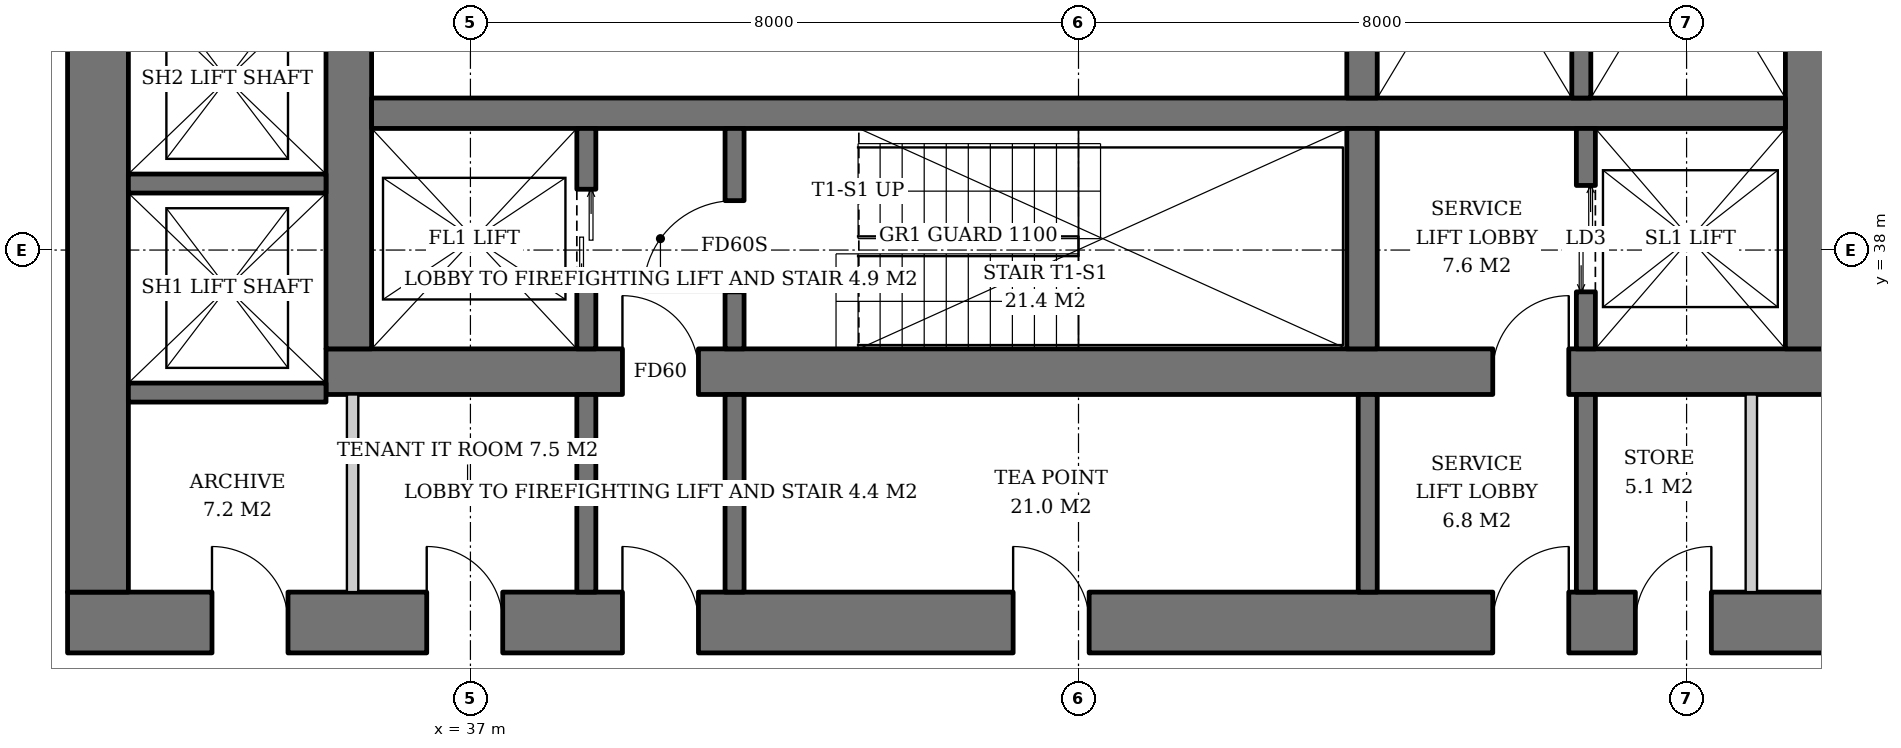
"""IFC4 building model, lengths in metres.
Left out: names, types, materials, properties, quantities, classifications, styles, units other than length and angle.
Written with IfcOpenShell. Run it as: python <this file> out.ifc"""

import sys

from ifc_helpers import new_model, si_unit, direction, frame, frame_2d, origin, place, context, subcontext, project, spatial, rectangle, extrude, element, fill, save


model = new_model("IFC4")
c1 = context("Model", 3, precision=1e-05, world=origin(), true_north=direction((0.0, 1.0)))
c2 = subcontext(c1, "Body", "Model", "MODEL_VIEW")
j1 = project(units=[si_unit("LENGTHUNIT", "METRE"), si_unit("PLANEANGLEUNIT", "RADIAN")], contexts=[c1])
p1 = place(None, origin())
s1 = spatial("IfcSite", under=j1, at=p1, CompositionType="ELEMENT")
p2 = place(p1, origin())
s2 = spatial("IfcBuilding", under=s1, at=p2, CompositionType="ELEMENT")
p3 = place(p2, frame((0.0, 0.0, 47.6)))
s3 = spatial("IfcBuildingStorey", under=s2, at=p3, CompositionType="ELEMENT", Elevation=47.6)
p4 = place(p3, frame((35.1, 36.4, 0.0), z_axis=(0.0, 0.0, 1.0), x_axis=(1.0, 0.0, 0.0)))
e1 = element("IfcWall", 1, at=p4, inside=s3, PredefinedType="SHEAR", context=c2, shape_type="SweptSolid", body=[
    extrude(rectangle(XDim=19.8, YDim=0.6, at=frame_2d((9.9, 0.0))), origin(), (0.0, 0.0, 1.0), 3.8),
])
p5 = place(p4, frame((3.9, 0.0, 0.0)))
e2 = element("IfcOpeningElement", 2, at=p5, cuts=e1, PredefinedType="OPENING", context=c2, shape_type="SweptSolid", body=[
    extrude(rectangle(XDim=1.0, YDim=2.1, at=frame_2d((0.5, 1.05))), frame((0.0, 0.31, 0.0), z_axis=(0.0, -1.0, 0.0), x_axis=(1.0, 0.0, 0.0)), (0.0, 0.0, 1.0), 0.62),
])
p6 = place(p4, frame((15.35, 0.0, 0.0)))
e3 = element("IfcOpeningElement", 3, at=p6, cuts=e1, PredefinedType="OPENING", context=c2, shape_type="SweptSolid", body=[
    extrude(rectangle(XDim=1.0, YDim=2.1, at=frame_2d((0.5, 1.05))), frame((0.0, 0.31, 0.0), z_axis=(0.0, -1.0, 0.0), x_axis=(1.0, 0.0, 0.0)), (0.0, 0.0, 1.0), 0.62),
])
p7 = place(p3, frame((35.4, 36.7, 0.0), z_axis=(0.0, 0.0, 1.0), x_axis=(0.0, 1.0, 0.0)))
e4 = element("IfcWall", 4, at=p7, inside=s3, PredefinedType="SHEAR", context=c2, shape_type="SweptSolid", body=[
    extrude(rectangle(XDim=18.6, YDim=0.6, at=frame_2d((9.3, 0.0))), origin(), (0.0, 0.0, 1.0), 3.8),
])
p8 = place(p7, frame((8.4, 0.0, 0.0)))
e5 = element("IfcOpeningElement", 5, at=p8, cuts=e4, PredefinedType="OPENING", context=c2, shape_type="SweptSolid", body=[
    extrude(rectangle(XDim=1.8, YDim=2.4, at=frame_2d((0.9, 1.2))), frame((0.0, 0.31, 0.0), z_axis=(0.0, -1.0, 0.0), x_axis=(1.0, 0.0, 0.0)), (0.0, 0.0, 1.0), 0.62),
])
p9 = place(p3, frame((54.6, 36.7, 0.0), z_axis=(0.0, 0.0, 1.0), x_axis=(0.0, 1.0, 0.0)))
e6 = element("IfcWall", 6, at=p9, inside=s3, PredefinedType="SHEAR", context=c2, shape_type="SweptSolid", body=[
    extrude(rectangle(XDim=18.6, YDim=0.6, at=frame_2d((9.3, 0.0))), origin(), (0.0, 0.0, 1.0), 3.8),
])
p10 = place(p9, frame((8.4, 0.0, 0.0)))
e7 = element("IfcOpeningElement", 7, at=p10, cuts=e6, PredefinedType="OPENING", context=c2, shape_type="SweptSolid", body=[
    extrude(rectangle(XDim=1.8, YDim=2.4, at=frame_2d((0.9, 1.2))), frame((0.0, 0.31, 0.0), z_axis=(0.0, -1.0, 0.0), x_axis=(1.0, 0.0, 0.0)), (0.0, 0.0, 1.0), 0.62),
])
p11 = place(p3, frame((31.7, 33.1, 0.0), z_axis=(0.0, 0.0, 1.0), x_axis=(1.0, 0.0, 0.0)))
e8 = element("IfcWall", 8, at=p11, inside=s3, PredefinedType="SHEAR", context=c2, shape_type="SweptSolid", body=[
    extrude(rectangle(XDim=26.6, YDim=0.8, at=frame_2d((13.3, 0.0))), origin(), (0.0, 0.0, 1.0), 3.8),
])
p12 = place(p11, frame((7.3, 0.0, 0.0)))
e9 = element("IfcOpeningElement", 9, at=p12, cuts=e8, PredefinedType="OPENING", context=c2, shape_type="SweptSolid", body=[
    extrude(rectangle(XDim=1.0, YDim=2.1, at=frame_2d((0.5, 1.05))), frame((0.0, 0.41, 0.0), z_axis=(0.0, -1.0, 0.0), x_axis=(1.0, 0.0, 0.0)), (0.0, 0.0, 1.0), 0.82),
])
p13 = place(p11, frame((18.75, 0.0, 0.0)))
e10 = element("IfcOpeningElement", 10, at=p13, cuts=e8, PredefinedType="OPENING", context=c2, shape_type="SweptSolid", body=[
    extrude(rectangle(XDim=1.0, YDim=2.1, at=frame_2d((0.5, 1.05))), frame((0.0, 0.41, 0.0), z_axis=(0.0, -1.0, 0.0), x_axis=(1.0, 0.0, 0.0)), (0.0, 0.0, 1.0), 0.82),
])
p14 = place(p11, frame((1.9, 0.0, 0.0)))
e11 = element("IfcOpeningElement", 11, at=p14, cuts=e8, PredefinedType="OPENING", context=c2, shape_type="SweptSolid", body=[
    extrude(rectangle(XDim=1.0, YDim=2.1, at=frame_2d((0.5, 1.05))), frame((0.0, 0.41, 0.0), z_axis=(0.0, -1.0, 0.0), x_axis=(1.0, 0.0, 0.0)), (0.0, 0.0, 1.0), 0.82),
])
p15 = place(p11, frame((4.725, 0.0, 0.0)))
e12 = element("IfcOpeningElement", 12, at=p15, cuts=e8, PredefinedType="OPENING", context=c2, shape_type="SweptSolid", body=[
    extrude(rectangle(XDim=1.0, YDim=2.1, at=frame_2d((0.5, 1.05))), frame((0.0, 0.41, 0.0), z_axis=(0.0, -1.0, 0.0), x_axis=(1.0, 0.0, 0.0)), (0.0, 0.0, 1.0), 0.82),
])
p16 = place(p11, frame((12.44, 0.0, 0.0)))
e13 = element("IfcOpeningElement", 13, at=p16, cuts=e8, PredefinedType="OPENING", context=c2, shape_type="SweptSolid", body=[
    extrude(rectangle(XDim=1.0, YDim=2.1, at=frame_2d((0.5, 1.05))), frame((0.0, 0.41, 0.0), z_axis=(0.0, -1.0, 0.0), x_axis=(1.0, 0.0, 0.0)), (0.0, 0.0, 1.0), 0.82),
])
p17 = place(p11, frame((20.626, 0.0, 0.0)))
e14 = element("IfcOpeningElement", 14, at=p17, cuts=e8, PredefinedType="OPENING", context=c2, shape_type="SweptSolid", body=[
    extrude(rectangle(XDim=1.0, YDim=2.1, at=frame_2d((0.5, 1.05))), frame((0.0, 0.41, 0.0), z_axis=(0.0, -1.0, 0.0), x_axis=(1.0, 0.0, 0.0)), (0.0, 0.0, 1.0), 0.82),
])
p18 = place(p11, frame((23.476, 0.0, 0.0)))
e15 = element("IfcOpeningElement", 15, at=p18, cuts=e8, PredefinedType="OPENING", context=c2, shape_type="SweptSolid", body=[
    extrude(rectangle(XDim=1.0, YDim=2.1, at=frame_2d((0.5, 1.05))), frame((0.0, 0.41, 0.0), z_axis=(0.0, -1.0, 0.0), x_axis=(1.0, 0.0, 0.0)), (0.0, 0.0, 1.0), 0.82),
])
p19 = place(p3, frame((32.1, 33.5, 0.0), z_axis=(0.0, 0.0, 1.0), x_axis=(0.0, 1.0, 0.0)))
e16 = element("IfcWall", 16, at=p19, inside=s3, PredefinedType="SHEAR", context=c2, shape_type="SweptSolid", body=[
    extrude(rectangle(XDim=25.0, YDim=0.8, at=frame_2d((12.5, 0.0))), origin(), (0.0, 0.0, 1.0), 3.8),
])
p20 = place(p19, frame((11.6, 0.0, 0.0)))
e17 = element("IfcOpeningElement", 17, at=p20, cuts=e16, PredefinedType="OPENING", context=c2, shape_type="SweptSolid", body=[
    extrude(rectangle(XDim=1.8, YDim=2.4, at=frame_2d((0.9, 1.2))), frame((0.0, 0.41, 0.0), z_axis=(0.0, -1.0, 0.0), x_axis=(1.0, 0.0, 0.0)), (0.0, 0.0, 1.0), 0.82),
])
p21 = place(p3, frame((35.7, 39.8, 0.0), z_axis=(0.0, 0.0, 1.0), x_axis=(1.0, 0.0, 0.0)))
e18 = element("IfcWall", 18, at=p21, inside=s3, PredefinedType="SHEAR", context=c2, shape_type="SweptSolid", body=[
    extrude(rectangle(XDim=18.6, YDim=0.4, at=frame_2d((9.3, 0.0))), origin(), (0.0, 0.0, 1.0), 3.8),
])
p22 = place(p3, frame((48.73, 36.7, 0.0), z_axis=(0.0, 0.0, 1.0), x_axis=(0.0, 1.0, 0.0)))
e19 = element("IfcWall", 19, at=p22, inside=s3, PredefinedType="SHEAR", context=c2, shape_type="SweptSolid", body=[
    extrude(rectangle(XDim=2.9, YDim=0.4, at=frame_2d((1.45, 0.0))), origin(), (0.0, 0.0, 1.0), 3.8),
])
p23 = place(p3, frame((48.73, 40.0, 0.0), z_axis=(0.0, 0.0, 1.0), x_axis=(0.0, 1.0, 0.0)))
e20 = element("IfcWall", 20, at=p23, inside=s3, PredefinedType="SHEAR", context=c2, shape_type="SweptSolid", body=[
    extrude(rectangle(XDim=12.0, YDim=0.4, at=frame_2d((6.0, 0.0))), origin(), (0.0, 0.0, 1.0), 3.8),
])
p24 = place(p3, frame((38.525, 36.7, 0.0), z_axis=(0.0, 0.0, 1.0), x_axis=(0.0, 1.0, 0.0)))
e21 = element("IfcWall", 21, at=p24, inside=s3, PredefinedType="SHEAR", context=c2, shape_type="SweptSolid", body=[
    extrude(rectangle(XDim=2.9, YDim=0.25, at=frame_2d((1.45, 0.0))), origin(), (0.0, 0.0, 1.0), 3.8),
])
p25 = place(p24, frame((0.8, 0.0, 0.0)))
e22 = element("IfcOpeningElement", 22, at=p25, cuts=e21, PredefinedType="OPENING", context=c2, shape_type="SweptSolid", body=[
    extrude(rectangle(XDim=1.3, YDim=2.2, at=frame_2d((0.65, 1.1))), frame((0.0, 0.135, 0.0), z_axis=(0.0, -1.0, 0.0), x_axis=(1.0, 0.0, 0.0)), (0.0, 0.0, 1.0), 0.27),
])
p26 = place(p3, frame((40.475, 36.7, 0.0), z_axis=(0.0, 0.0, 1.0), x_axis=(0.0, 1.0, 0.0)))
e23 = element("IfcWall", 23, at=p26, inside=s3, PredefinedType="SHEAR", context=c2, shape_type="SweptSolid", body=[
    extrude(rectangle(XDim=2.9, YDim=0.25, at=frame_2d((1.45, 0.0))), origin(), (0.0, 0.0, 1.0), 3.8),
])
p27 = place(p26, frame((0.75, 0.0, 0.0)))
e24 = element("IfcOpeningElement", 24, at=p27, cuts=e23, PredefinedType="OPENING", context=c2, shape_type="SweptSolid", body=[
    extrude(rectangle(XDim=1.2, YDim=2.1, at=frame_2d((0.6, 1.05))), frame((0.0, 0.135, 0.0), z_axis=(0.0, -1.0, 0.0), x_axis=(1.0, 0.0, 0.0)), (0.0, 0.0, 1.0), 0.27),
])
p28 = place(p3, frame((51.675, 36.7, 0.0), z_axis=(0.0, 0.0, 1.0), x_axis=(0.0, 1.0, 0.0)))
e25 = element("IfcWall", 25, at=p28, inside=s3, PredefinedType="SHEAR", context=c2, shape_type="SweptSolid", body=[
    extrude(rectangle(XDim=2.9, YDim=0.25, at=frame_2d((1.45, 0.0))), origin(), (0.0, 0.0, 1.0), 3.8),
])
p29 = place(p28, frame((0.75, 0.0, 0.0)))
e26 = element("IfcOpeningElement", 26, at=p29, cuts=e25, PredefinedType="OPENING", context=c2, shape_type="SweptSolid", body=[
    extrude(rectangle(XDim=1.4, YDim=2.4, at=frame_2d((0.7, 1.2))), frame((0.0, 0.135, 0.0), z_axis=(0.0, -1.0, 0.0), x_axis=(1.0, 0.0, 0.0)), (0.0, 0.0, 1.0), 0.27),
])
p30 = place(p3, frame((51.615, 44.25, 0.0), z_axis=(0.0, 0.0, 1.0), x_axis=(0.0, -1.0, 0.0)))
e27 = element("IfcWall", 27, at=p30, inside=s3, PredefinedType="SHEAR", context=c2, shape_type="SweptSolid", body=[
    extrude(rectangle(XDim=4.25, YDim=0.25, at=frame_2d((2.125, 0.0))), origin(), (0.0, 0.0, 1.0), 3.8),
])
for number, where, z_axis, x_axis in (
    (28, (32.5, 36.125, 0.0), (0.0, 0.0, 1.0), (1.0, 0.0, 0.0)),
    (29, (32.5, 38.875, 0.0), (0.0, 0.0, 1.0), (1.0, 0.0, 0.0)),
):
    element("IfcWall", number, at=place(p3, frame(where, z_axis=z_axis, x_axis=x_axis)), inside=s3, PredefinedType="SHEAR", context=c2, shape_type="SweptSolid", body=[
        extrude(rectangle(XDim=2.6, YDim=0.25, at=frame_2d((1.3, 0.0))), origin(), (0.0, 0.0, 1.0), 3.8),
    ])
for number, where, z_axis, x_axis in (
    (30, (38.525, 33.5, 0.0), (0.0, 0.0, 1.0), (0.0, 1.0, 0.0)),
    (31, (40.475, 33.5, 0.0), (0.0, 0.0, 1.0), (0.0, 1.0, 0.0)),
    (32, (48.805, 33.5, 0.0), (0.0, 0.0, 1.0), (0.0, 1.0, 0.0)),
    (33, (51.675, 33.5, 0.0), (0.0, 0.0, 1.0), (0.0, 1.0, 0.0)),
):
    element("IfcWall", number, at=place(p3, frame(where, z_axis=z_axis, x_axis=x_axis)), inside=s3, PredefinedType="SOLIDWALL", context=c2, shape_type="SweptSolid", body=[
        extrude(rectangle(XDim=2.6, YDim=0.25, at=frame_2d((1.3, 0.0))), origin(), (0.0, 0.0, 1.0), 3.62),
    ])
for number, where, z_axis, x_axis in (
    (34, (35.45, 33.5, 0.0), (0.0, 0.0, 1.0), (0.0, 1.0, 0.0)),
    (35, (53.852, 33.5, 0.0), (0.0, 0.0, 1.0), (0.0, 1.0, 0.0)),
):
    element("IfcWall", number, at=place(p3, frame(where, z_axis=z_axis, x_axis=x_axis)), inside=s3, PredefinedType="SOLIDWALL", context=c2, shape_type="SweptSolid", body=[
        extrude(rectangle(XDim=2.6, YDim=0.15, at=frame_2d((1.3, 0.0))), origin(), (0.0, 0.0, 1.0), 3.62),
    ])
p31 = place(p25, origin())
e36 = element("IfcDoor", 36, at=p31, inside=s3, OperationType="DOUBLE_DOOR_SLIDING", PredefinedType="DOOR", context=c2, shape_type="SweptSolid", body=[
    extrude(rectangle(XDim=1.3, YDim=2.2, at=frame_2d((0.65, 1.1))), frame((0.0, 0.025, 0.0), z_axis=(0.0, -1.0, 0.0), x_axis=(1.0, 0.0, 0.0)), (0.0, 0.0, 1.0), 0.05),
])
fill(e22, e36)
p32 = place(p27, origin())
e37 = element("IfcDoor", 37, at=p32, inside=s3, OperationType="SINGLE_SWING_LEFT", PredefinedType="DOOR", context=c2, shape_type="SweptSolid", body=[
    extrude(rectangle(XDim=1.2, YDim=2.1, at=frame_2d((0.6, 1.05))), frame((0.0, 0.025, 0.0), z_axis=(0.0, -1.0, 0.0), x_axis=(1.0, 0.0, 0.0)), (0.0, 0.0, 1.0), 0.05),
])
fill(e24, e37)
p33 = place(p29, origin())
e38 = element("IfcDoor", 38, at=p33, inside=s3, OperationType="DOUBLE_DOOR_SLIDING", PredefinedType="DOOR", context=c2, shape_type="SweptSolid", body=[
    extrude(rectangle(XDim=1.4, YDim=2.4, at=frame_2d((0.7, 1.2))), frame((0.0, 0.025, 0.0), z_axis=(0.0, -1.0, 0.0), x_axis=(1.0, 0.0, 0.0)), (0.0, 0.0, 1.0), 0.05),
])
fill(e26, e38)
p34 = place(p5, origin())
e39 = element("IfcDoor", 39, at=p34, inside=s3, OperationType="SINGLE_SWING_LEFT", PredefinedType="DOOR", context=c2, shape_type="SweptSolid", body=[
    extrude(rectangle(XDim=1.0, YDim=2.1, at=frame_2d((0.5, 1.05))), frame((0.0, 0.025, 0.0), z_axis=(0.0, -1.0, 0.0), x_axis=(1.0, 0.0, 0.0)), (0.0, 0.0, 1.0), 0.05),
])
fill(e2, e39)
p35 = place(p6, origin())
e40 = element("IfcDoor", 40, at=p35, inside=s3, OperationType="SINGLE_SWING_RIGHT", PredefinedType="DOOR", context=c2, shape_type="SweptSolid", body=[
    extrude(rectangle(XDim=1.0, YDim=2.1, at=frame_2d((0.5, 1.05))), frame((0.0, 0.025, 0.0), z_axis=(0.0, -1.0, 0.0), x_axis=(1.0, 0.0, 0.0)), (0.0, 0.0, 1.0), 0.05),
])
fill(e3, e40)
p36 = place(p12, origin())
e41 = element("IfcDoor", 41, at=p36, inside=s3, OperationType="SINGLE_SWING_LEFT", PredefinedType="DOOR", context=c2, shape_type="SweptSolid", body=[
    extrude(rectangle(XDim=1.0, YDim=2.1, at=frame_2d((0.5, 1.05))), frame((0.0, 0.025, 0.0), z_axis=(0.0, -1.0, 0.0), x_axis=(1.0, 0.0, 0.0)), (0.0, 0.0, 1.0), 0.05),
])
fill(e9, e41)
p37 = place(p13, origin())
e42 = element("IfcDoor", 42, at=p37, inside=s3, OperationType="SINGLE_SWING_RIGHT", PredefinedType="DOOR", context=c2, shape_type="SweptSolid", body=[
    extrude(rectangle(XDim=1.0, YDim=2.1, at=frame_2d((0.5, 1.05))), frame((0.0, 0.025, 0.0), z_axis=(0.0, -1.0, 0.0), x_axis=(1.0, 0.0, 0.0)), (0.0, 0.0, 1.0), 0.05),
])
fill(e10, e42)
p38 = place(p14, origin())
e43 = element("IfcDoor", 43, at=p38, inside=s3, OperationType="SINGLE_SWING_LEFT", PredefinedType="DOOR", context=c2, shape_type="SweptSolid", body=[
    extrude(rectangle(XDim=1.0, YDim=2.1, at=frame_2d((0.5, 1.05))), frame((0.0, 0.39, 0.0), z_axis=(0.0, -1.0, 0.0), x_axis=(1.0, 0.0, 0.0)), (0.0, 0.0, 1.0), 0.05),
])
fill(e11, e43)
p39 = place(p15, origin())
e44 = element("IfcDoor", 44, at=p39, inside=s3, OperationType="SINGLE_SWING_LEFT", PredefinedType="DOOR", context=c2, shape_type="SweptSolid", body=[
    extrude(rectangle(XDim=1.0, YDim=2.1, at=frame_2d((0.5, 1.05))), frame((0.0, 0.39, 0.0), z_axis=(0.0, -1.0, 0.0), x_axis=(1.0, 0.0, 0.0)), (0.0, 0.0, 1.0), 0.05),
])
fill(e12, e44)
p40 = place(p16, origin())
e45 = element("IfcDoor", 45, at=p40, inside=s3, OperationType="SINGLE_SWING_LEFT", PredefinedType="DOOR", context=c2, shape_type="SweptSolid", body=[
    extrude(rectangle(XDim=1.0, YDim=2.1, at=frame_2d((0.5, 1.05))), frame((0.0, 0.39, 0.0), z_axis=(0.0, -1.0, 0.0), x_axis=(1.0, 0.0, 0.0)), (0.0, 0.0, 1.0), 0.05),
])
fill(e13, e45)
p41 = place(p17, origin())
e46 = element("IfcDoor", 46, at=p41, inside=s3, OperationType="SINGLE_SWING_RIGHT", PredefinedType="DOOR", context=c2, shape_type="SweptSolid", body=[
    extrude(rectangle(XDim=1.0, YDim=2.1, at=frame_2d((0.5, 1.05))), frame((0.0, 0.39, 0.0), z_axis=(0.0, -1.0, 0.0), x_axis=(1.0, 0.0, 0.0)), (0.0, 0.0, 1.0), 0.05),
])
fill(e14, e46)
save(model, sys.argv[1])
